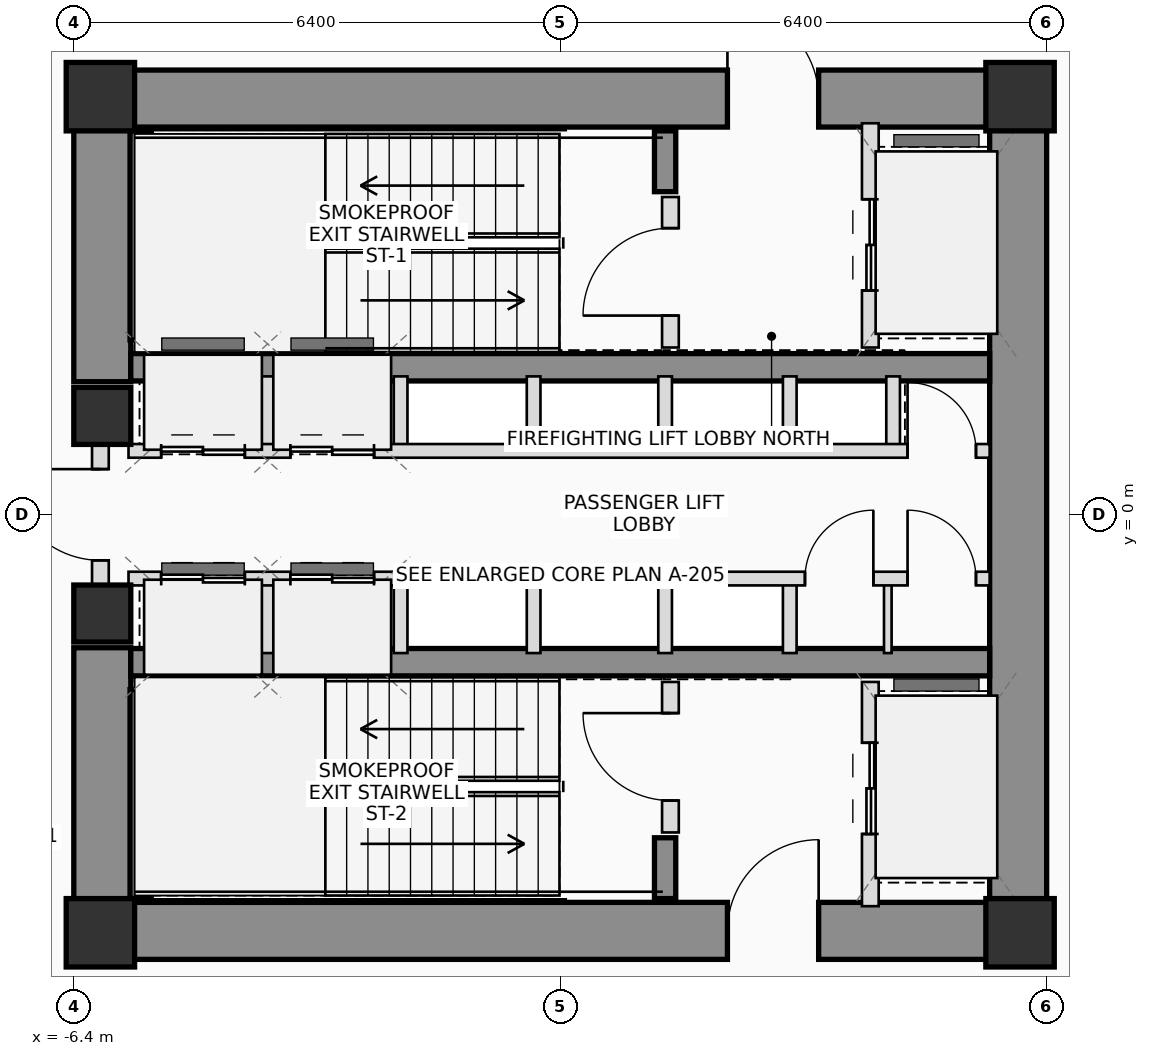
"""IFC4 building model, lengths in metres.
Left out: names, types, materials, properties, quantities, classifications, styles, units other than length and angle.
Written with IfcOpenShell. Run it as: python <this file> out.ifc"""

import sys

from ifc_helpers import new_model, si_unit, direction, frame, frame_2d, origin, origin_2d, place, context, subcontext, project, spatial, rectangle, extrude, source, transform, mapped, element, fill, save


model = new_model("IFC4")
c1 = context("Model", 3, precision=1e-05, world=origin(), true_north=direction((0.0, 1.0)))
c2 = subcontext(c1, "Body", "Model", "MODEL_VIEW")
j1 = project(units=[si_unit("LENGTHUNIT", "METRE"), si_unit("PLANEANGLEUNIT", "RADIAN")], contexts=[c1])
p1 = place(None, origin())
s1 = spatial("IfcSite", under=j1, at=p1, CompositionType="ELEMENT")
p2 = place(p1, origin())
s2 = spatial("IfcBuilding", under=s1, at=p2, CompositionType="ELEMENT")
p3 = place(p2, frame((0.0, 0.0, 42.3)))
s3 = spatial("IfcBuildingStorey", under=s2, at=p3, CompositionType="ELEMENT", Elevation=42.3)
m1 = source(origin(), c2, "Body", "SweptSolid", [
    extrude(rectangle(XDim=0.9, YDim=0.9, at=origin_2d()), origin(), (0.0, 0.0, 1.0), 3.7),
])
for number, where, z_axis, x_axis in (
    (1, (-6.05, -5.5, 0.0), (0.0, 0.0, 1.0), (1.0, 0.0, 0.0)),
    (2, (6.05, -5.5, 0.0), (0.0, 0.0, 1.0), (1.0, 0.0, 0.0)),
    (3, (6.05, 5.5, 0.0), (0.0, 0.0, 1.0), (1.0, 0.0, 0.0)),
    (4, (-6.05, 5.5, 0.0), (0.0, 0.0, 1.0), (1.0, 0.0, 0.0)),
):
    element("IfcColumn", number, at=place(p3, frame(where, z_axis=z_axis, x_axis=x_axis)), inside=s3, PredefinedType="COLUMN", context=c2, shape_type="MappedRepresentation", body=[
        mapped(m1, transform((0.0, 0.0, 0.0), scale=1.0)),
    ])
p4 = place(p3, frame((-6.4, 5.475, 0.0), z_axis=(0.0, 0.0, 1.0), x_axis=(1.0, 0.0, 0.0)))
e5 = element("IfcWall", 5, at=p4, inside=s3, PredefinedType="SHEAR", context=c2, shape_type="SweptSolid", body=[
    extrude(rectangle(XDim=12.8, YDim=0.75, at=frame_2d((6.4, 0.0))), origin(), (0.0, 0.0, 1.0), 3.7),
])
p5 = place(p4, frame((8.6, 0.0, 0.0)))
e6 = element("IfcOpeningElement", 6, at=p5, cuts=e5, PredefinedType="OPENING", context=c2, shape_type="SweptSolid", body=[
    extrude(rectangle(XDim=1.2, YDim=2.2, at=frame_2d((0.6, 1.1))), frame((0.0, 0.385, 0.0), z_axis=(0.0, -1.0, 0.0), x_axis=(1.0, 0.0, 0.0)), (0.0, 0.0, 1.0), 0.77),
])
p6 = place(p3, frame((-6.4, -5.475, 0.0), z_axis=(0.0, 0.0, 1.0), x_axis=(1.0, 0.0, 0.0)))
e7 = element("IfcWall", 7, at=p6, inside=s3, PredefinedType="SHEAR", context=c2, shape_type="SweptSolid", body=[
    extrude(rectangle(XDim=12.8, YDim=0.75, at=frame_2d((6.4, 0.0))), origin(), (0.0, 0.0, 1.0), 3.7),
])
p7 = place(p6, frame((8.6, 0.0, 0.0)))
e8 = element("IfcOpeningElement", 8, at=p7, cuts=e7, PredefinedType="OPENING", context=c2, shape_type="SweptSolid", body=[
    extrude(rectangle(XDim=1.2, YDim=2.2, at=frame_2d((0.6, 1.1))), frame((0.0, 0.385, 0.0), z_axis=(0.0, -1.0, 0.0), x_axis=(1.0, 0.0, 0.0)), (0.0, 0.0, 1.0), 0.77),
])
p8 = place(p3, frame((6.025, -5.1, 0.0), z_axis=(0.0, 0.0, 1.0), x_axis=(0.0, 1.0, 0.0)))
e9 = element("IfcWall", 9, at=p8, inside=s3, PredefinedType="SHEAR", context=c2, shape_type="SweptSolid", body=[
    extrude(rectangle(XDim=10.2, YDim=0.75, at=frame_2d((5.1, 0.0))), origin(), (0.0, 0.0, 1.0), 3.7),
])
for number, where, z_axis, x_axis in (
    (10, (-6.025, -5.1, 0.0), (0.0, 0.0, 1.0), (0.0, 1.0, 0.0)),
    (11, (-6.025, 1.75, 0.0), (0.0, 0.0, 1.0), (0.0, 1.0, 0.0)),
):
    element("IfcWall", number, at=place(p3, frame(where, z_axis=z_axis, x_axis=x_axis)), inside=s3, PredefinedType="SHEAR", context=c2, shape_type="SweptSolid", body=[
        extrude(rectangle(XDim=3.35, YDim=0.75, at=frame_2d((1.675, 0.0))), origin(), (0.0, 0.0, 1.0), 3.7),
    ])
for number, where, z_axis, x_axis in (
    (12, (-5.65, 1.94, 0.0), (0.0, 0.0, 1.0), (1.0, 0.0, 0.0)),
    (13, (-5.65, -1.94, 0.0), (0.0, 0.0, 1.0), (1.0, 0.0, 0.0)),
):
    element("IfcWall", number, at=place(p3, frame(where, z_axis=z_axis, x_axis=x_axis)), inside=s3, PredefinedType="SHEAR", context=c2, shape_type="SweptSolid", body=[
        extrude(rectangle(XDim=11.3, YDim=0.36, at=frame_2d((5.65, 0.0))), origin(), (0.0, 0.0, 1.0), 3.7),
    ])
p9 = place(p3, frame((-5.52, 2.3, 0.0), z_axis=(0.0, 0.0, 1.0), x_axis=(0.0, 1.0, 0.0)))
e14 = element("IfcWall", 14, at=p9, inside=s3, PredefinedType="SHEAR", context=c2, shape_type="SweptSolid", body=[
    extrude(rectangle(XDim=2.75, YDim=0.28, at=frame_2d((1.375, 0.0))), origin(), (0.0, 0.0, 1.0), 3.7),
])
p10 = place(p3, frame((1.38, 4.25, 0.0), z_axis=(0.0, 0.0, 1.0), x_axis=(0.0, 1.0, 0.0)))
e15 = element("IfcWall", 15, at=p10, inside=s3, PredefinedType="SHEAR", context=c2, shape_type="SweptSolid", body=[
    extrude(rectangle(XDim=0.8, YDim=0.28, at=frame_2d((0.4, 0.0))), origin(), (0.0, 0.0, 1.0), 3.7),
])
p11 = place(p3, frame((-5.52, -5.05, 0.0), z_axis=(0.0, 0.0, 1.0), x_axis=(0.0, 1.0, 0.0)))
e16 = element("IfcWall", 16, at=p11, inside=s3, PredefinedType="SHEAR", context=c2, shape_type="SweptSolid", body=[
    extrude(rectangle(XDim=2.75, YDim=0.28, at=frame_2d((1.375, 0.0))), origin(), (0.0, 0.0, 1.0), 3.7),
])
p12 = place(p3, frame((1.38, -5.05, 0.0), z_axis=(0.0, 0.0, 1.0), x_axis=(0.0, 1.0, 0.0)))
e17 = element("IfcWall", 17, at=p12, inside=s3, PredefinedType="SHEAR", context=c2, shape_type="SweptSolid", body=[
    extrude(rectangle(XDim=0.8, YDim=0.28, at=frame_2d((0.4, 0.0))), origin(), (0.0, 0.0, 1.0), 3.7),
])
m2 = source(origin(), c2, "Body", "SweptSolid", [
    extrude(rectangle(XDim=0.75, YDim=0.75, at=origin_2d()), origin(), (0.0, 0.0, 1.0), 3.7),
])
for number, where, z_axis, x_axis in (
    (18, (-6.025, -1.3, 0.0), (0.0, 0.0, 1.0), (1.0, 0.0, 0.0)),
    (19, (-6.025, 1.3, 0.0), (0.0, 0.0, 1.0), (1.0, 0.0, 0.0)),
):
    element("IfcColumn", number, at=place(p3, frame(where, z_axis=z_axis, x_axis=x_axis)), inside=s3, PredefinedType="COLUMN", context=c2, shape_type="MappedRepresentation", body=[
        mapped(m2, transform((0.0, 0.0, 0.0), scale=1.0)),
    ])
p13 = place(p3, frame((-6.05, -0.95, 0.0), z_axis=(0.0, 0.0, 1.0), x_axis=(0.0, 1.0, 0.0)))
e20 = element("IfcWall", 20, at=p13, inside=s3, PredefinedType="PLUMBINGWALL", context=c2, shape_type="SweptSolid", body=[
    extrude(rectangle(XDim=1.9, YDim=0.22, at=frame_2d((0.95, 0.0))), origin(), (0.0, 0.0, 1.0), 2.475),
])
p14 = place(p13, frame((0.35, 0.0, 0.0)))
e21 = element("IfcOpeningElement", 21, at=p14, cuts=e20, PredefinedType="OPENING", context=c2, shape_type="SweptSolid", body=[
    extrude(rectangle(XDim=1.2, YDim=2.2, at=frame_2d((0.6, 1.1))), frame((0.0, 0.12, 0.0), z_axis=(0.0, -1.0, 0.0), x_axis=(1.0, 0.0, 0.0)), (0.0, 0.0, 1.0), 0.24),
])
p15 = place(p3, frame((1.45, 2.2, 0.0), z_axis=(0.0, 0.0, 1.0), x_axis=(0.0, 1.0, 0.0)))
e22 = element("IfcWall", 22, at=p15, inside=s3, PredefinedType="PLUMBINGWALL", context=c2, shape_type="SweptSolid", body=[
    extrude(rectangle(XDim=1.98, YDim=0.22, at=frame_2d((0.99, 0.0))), origin(), (0.0, 0.0, 1.0), 3.495),
])
p16 = place(p15, frame((0.42, 0.0, 0.0)))
e23 = element("IfcOpeningElement", 23, at=p16, cuts=e22, PredefinedType="OPENING", context=c2, shape_type="SweptSolid", body=[
    extrude(rectangle(XDim=1.15, YDim=2.15, at=frame_2d((0.575, 1.075))), frame((0.0, 0.12, 0.0), z_axis=(0.0, -1.0, 0.0), x_axis=(1.0, 0.0, 0.0)), (0.0, 0.0, 1.0), 0.24),
])
p17 = place(p3, frame((4.08, 2.2, 0.0), z_axis=(0.0, 0.0, 1.0), x_axis=(0.0, 1.0, 0.0)))
e24 = element("IfcWall", 24, at=p17, inside=s3, PredefinedType="PLUMBINGWALL", context=c2, shape_type="SweptSolid", body=[
    extrude(rectangle(XDim=2.95, YDim=0.22, at=frame_2d((1.475, 0.0))), origin(), (0.0, 0.0, 1.0), 3.495),
])
p18 = place(p17, frame((0.75, 0.0, 0.0)))
e25 = element("IfcOpeningElement", 25, at=p18, cuts=e24, PredefinedType="OPENING", context=c2, shape_type="SweptSolid", body=[
    extrude(rectangle(XDim=1.2, YDim=2.25, at=frame_2d((0.6, 1.125))), frame((0.0, 0.12, 0.0), z_axis=(0.0, -1.0, 0.0), x_axis=(1.0, 0.0, 0.0)), (0.0, 0.0, 1.0), 0.24),
])
p19 = place(p3, frame((1.45, -4.18, 0.0), z_axis=(0.0, 0.0, 1.0), x_axis=(0.0, 1.0, 0.0)))
e26 = element("IfcWall", 26, at=p19, inside=s3, PredefinedType="PLUMBINGWALL", context=c2, shape_type="SweptSolid", body=[
    extrude(rectangle(XDim=1.98, YDim=0.22, at=frame_2d((0.99, 0.0))), origin(), (0.0, 0.0, 1.0), 3.495),
])
p20 = place(p19, frame((0.42, 0.0, 0.0)))
e27 = element("IfcOpeningElement", 27, at=p20, cuts=e26, PredefinedType="OPENING", context=c2, shape_type="SweptSolid", body=[
    extrude(rectangle(XDim=1.15, YDim=2.15, at=frame_2d((0.575, 1.075))), frame((0.0, 0.12, 0.0), z_axis=(0.0, -1.0, 0.0), x_axis=(1.0, 0.0, 0.0)), (0.0, 0.0, 1.0), 0.24),
])
p21 = place(p3, frame((4.08, -5.15, 0.0), z_axis=(0.0, 0.0, 1.0), x_axis=(0.0, 1.0, 0.0)))
e28 = element("IfcWall", 28, at=p21, inside=s3, PredefinedType="PLUMBINGWALL", context=c2, shape_type="SweptSolid", body=[
    extrude(rectangle(XDim=2.95, YDim=0.22, at=frame_2d((1.475, 0.0))), origin(), (0.0, 0.0, 1.0), 3.495),
])
p22 = place(p21, frame((0.95, 0.0, 0.0)))
e29 = element("IfcOpeningElement", 29, at=p22, cuts=e28, PredefinedType="OPENING", context=c2, shape_type="SweptSolid", body=[
    extrude(rectangle(XDim=1.2, YDim=2.25, at=frame_2d((0.6, 1.125))), frame((0.0, 0.12, 0.0), z_axis=(0.0, -1.0, 0.0), x_axis=(1.0, 0.0, 0.0)), (0.0, 0.0, 1.0), 0.24),
])
for number, where, z_axis, x_axis in (
    (30, (-3.85, 0.84, 0.0), (0.0, 0.0, 1.0), (0.0, 1.0, 0.0)),
    (31, (-3.85, -1.82, 0.0), (0.0, 0.0, 1.0), (0.0, 1.0, 0.0)),
    (32, (-2.1, 0.84, 0.0), (0.0, 0.0, 1.0), (0.0, 1.0, 0.0)),
    (33, (-2.1, -1.82, 0.0), (0.0, 0.0, 1.0), (0.0, 1.0, 0.0)),
    (34, (-0.35, 0.84, 0.0), (0.0, 0.0, 1.0), (0.0, 1.0, 0.0)),
    (35, (-0.35, -1.82, 0.0), (0.0, 0.0, 1.0), (0.0, 1.0, 0.0)),
    (36, (1.38, 0.84, 0.0), (0.0, 0.0, 1.0), (0.0, 1.0, 0.0)),
    (37, (1.38, -1.82, 0.0), (0.0, 0.0, 1.0), (0.0, 1.0, 0.0)),
    (38, (3.02, 0.84, 0.0), (0.0, 0.0, 1.0), (0.0, 1.0, 0.0)),
    (39, (4.38, 0.84, 0.0), (0.0, 0.0, 1.0), (0.0, 1.0, 0.0)),
    (40, (3.02, -1.82, 0.0), (0.0, 0.0, 1.0), (0.0, 1.0, 0.0)),
):
    element("IfcWall", number, at=place(p3, frame(where, z_axis=z_axis, x_axis=x_axis)), inside=s3, PredefinedType="PLUMBINGWALL", context=c2, shape_type="SweptSolid", body=[
        extrude(rectangle(XDim=0.98, YDim=0.18, at=frame_2d((0.49, 0.0))), origin(), (0.0, 0.0, 1.0), 3.495),
    ])
p23 = place(p3, frame((4.31, -1.82, 0.0), z_axis=(0.0, 0.0, 1.0), x_axis=(0.0, 1.0, 0.0)))
e41 = element("IfcWall", 41, at=p23, inside=s3, PredefinedType="PARTITIONING", context=c2, shape_type="SweptSolid", body=[
    extrude(rectangle(XDim=0.98, YDim=0.1, at=frame_2d((0.49, 0.0))), origin(), (0.0, 0.0, 1.0), 3.495),
])
p24 = place(p3, frame((-5.68, 0.84, 0.0), z_axis=(0.0, 0.0, 1.0), x_axis=(1.0, 0.0, 0.0)))
e42 = element("IfcWall", 42, at=p24, inside=s3, PredefinedType="PLUMBINGWALL", context=c2, shape_type="SweptSolid", body=[
    extrude(rectangle(XDim=11.33, YDim=0.18, at=frame_2d((5.665, 0.0))), origin(), (0.0, 0.0, 1.0), 3.495),
])
p25 = place(p24, frame((0.43, 0.0, 0.0)))
e43 = element("IfcOpeningElement", 43, at=p25, cuts=e42, PredefinedType="OPENING", context=c2, shape_type="SweptSolid", body=[
    extrude(rectangle(XDim=1.1, YDim=2.2, at=frame_2d((0.55, 1.1))), frame((0.0, 0.1, 0.0), z_axis=(0.0, -1.0, 0.0), x_axis=(1.0, 0.0, 0.0)), (0.0, 0.0, 1.0), 0.2),
])
p26 = place(p24, frame((2.13, 0.0, 0.0)))
e44 = element("IfcOpeningElement", 44, at=p26, cuts=e42, PredefinedType="OPENING", context=c2, shape_type="SweptSolid", body=[
    extrude(rectangle(XDim=1.1, YDim=2.2, at=frame_2d((0.55, 1.1))), frame((0.0, 0.1, 0.0), z_axis=(0.0, -1.0, 0.0), x_axis=(1.0, 0.0, 0.0)), (0.0, 0.0, 1.0), 0.2),
])
p27 = place(p24, frame((10.25, 0.0, 0.0)))
e45 = element("IfcOpeningElement", 45, at=p27, cuts=e42, PredefinedType="OPENING", context=c2, shape_type="SweptSolid", body=[
    extrude(rectangle(XDim=0.9, YDim=2.05, at=frame_2d((0.45, 1.025))), frame((0.0, 0.1, 0.0), z_axis=(0.0, -1.0, 0.0), x_axis=(1.0, 0.0, 0.0)), (0.0, 0.0, 1.0), 0.2),
])
p28 = place(p3, frame((-5.68, -0.84, 0.0), z_axis=(0.0, 0.0, 1.0), x_axis=(1.0, 0.0, 0.0)))
e46 = element("IfcWall", 46, at=p28, inside=s3, PredefinedType="PLUMBINGWALL", context=c2, shape_type="SweptSolid", body=[
    extrude(rectangle(XDim=11.33, YDim=0.18, at=frame_2d((5.665, 0.0))), origin(), (0.0, 0.0, 1.0), 3.495),
])
p29 = place(p28, frame((0.43, 0.0, 0.0)))
e47 = element("IfcOpeningElement", 47, at=p29, cuts=e46, PredefinedType="OPENING", context=c2, shape_type="SweptSolid", body=[
    extrude(rectangle(XDim=1.1, YDim=2.2, at=frame_2d((0.55, 1.1))), frame((0.0, 0.1, 0.0), z_axis=(0.0, -1.0, 0.0), x_axis=(1.0, 0.0, 0.0)), (0.0, 0.0, 1.0), 0.2),
])
p30 = place(p28, frame((2.13, 0.0, 0.0)))
e48 = element("IfcOpeningElement", 48, at=p30, cuts=e46, PredefinedType="OPENING", context=c2, shape_type="SweptSolid", body=[
    extrude(rectangle(XDim=1.1, YDim=2.2, at=frame_2d((0.55, 1.1))), frame((0.0, 0.1, 0.0), z_axis=(0.0, -1.0, 0.0), x_axis=(1.0, 0.0, 0.0)), (0.0, 0.0, 1.0), 0.2),
])
p31 = place(p28, frame((8.9, 0.0, 0.0)))
e49 = element("IfcOpeningElement", 49, at=p31, cuts=e46, PredefinedType="OPENING", context=c2, shape_type="SweptSolid", body=[
    extrude(rectangle(XDim=0.9, YDim=2.05, at=frame_2d((0.45, 1.025))), frame((0.0, 0.1, 0.0), z_axis=(0.0, -1.0, 0.0), x_axis=(1.0, 0.0, 0.0)), (0.0, 0.0, 1.0), 0.2),
])
p32 = place(p28, frame((10.25, 0.0, 0.0)))
e50 = element("IfcOpeningElement", 50, at=p32, cuts=e46, PredefinedType="OPENING", context=c2, shape_type="SweptSolid", body=[
    extrude(rectangle(XDim=0.9, YDim=2.05, at=frame_2d((0.45, 1.025))), frame((0.0, 0.1, 0.0), z_axis=(0.0, -1.0, 0.0), x_axis=(1.0, 0.0, 0.0)), (0.0, 0.0, 1.0), 0.2),
])
p33 = place(p5, origin())
e51 = element("IfcDoor", 51, at=p33, inside=s3, OperationType="SINGLE_SWING_LEFT", PredefinedType="DOOR", context=c2, shape_type="SweptSolid", body=[
    extrude(rectangle(XDim=1.2, YDim=2.2, at=frame_2d((0.6, 1.1))), frame((0.0, 0.025, 0.0), z_axis=(0.0, -1.0, 0.0), x_axis=(1.0, 0.0, 0.0)), (0.0, 0.0, 1.0), 0.05),
])
fill(e6, e51)
p34 = place(p7, origin())
e52 = element("IfcDoor", 52, at=p34, inside=s3, OperationType="SINGLE_SWING_RIGHT", PredefinedType="DOOR", context=c2, shape_type="SweptSolid", body=[
    extrude(rectangle(XDim=1.2, YDim=2.2, at=frame_2d((0.6, 1.1))), frame((0.0, 0.025, 0.0), z_axis=(0.0, -1.0, 0.0), x_axis=(1.0, 0.0, 0.0)), (0.0, 0.0, 1.0), 0.05),
])
fill(e8, e52)
p35 = place(p14, origin())
e53 = element("IfcDoor", 53, at=p35, inside=s3, OperationType="SINGLE_SWING_RIGHT", PredefinedType="DOOR", context=c2, shape_type="SweptSolid", body=[
    extrude(rectangle(XDim=1.2, YDim=2.2, at=frame_2d((0.6, 1.1))), frame((0.0, 0.025, 0.0), z_axis=(0.0, -1.0, 0.0), x_axis=(1.0, 0.0, 0.0)), (0.0, 0.0, 1.0), 0.05),
])
fill(e21, e53)
p36 = place(p16, origin())
e54 = element("IfcDoor", 54, at=p36, inside=s3, OperationType="SINGLE_SWING_LEFT", PredefinedType="DOOR", context=c2, shape_type="SweptSolid", body=[
    extrude(rectangle(XDim=1.15, YDim=2.15, at=frame_2d((0.575, 1.075))), frame((0.0, 0.025, 0.0), z_axis=(0.0, -1.0, 0.0), x_axis=(1.0, 0.0, 0.0)), (0.0, 0.0, 1.0), 0.05),
])
fill(e23, e54)
p37 = place(p18, origin())
e55 = element("IfcDoor", 55, at=p37, inside=s3, OperationType="DOUBLE_DOOR_SLIDING", PredefinedType="DOOR", context=c2, shape_type="SweptSolid", body=[
    extrude(rectangle(XDim=1.2, YDim=2.25, at=frame_2d((0.6, 1.125))), frame((0.0, 0.025, 0.0), z_axis=(0.0, -1.0, 0.0), x_axis=(1.0, 0.0, 0.0)), (0.0, 0.0, 1.0), 0.05),
])
fill(e25, e55)
p38 = place(p20, origin())
e56 = element("IfcDoor", 56, at=p38, inside=s3, OperationType="SINGLE_SWING_RIGHT", PredefinedType="DOOR", context=c2, shape_type="SweptSolid", body=[
    extrude(rectangle(XDim=1.15, YDim=2.15, at=frame_2d((0.575, 1.075))), frame((0.0, 0.025, 0.0), z_axis=(0.0, -1.0, 0.0), x_axis=(1.0, 0.0, 0.0)), (0.0, 0.0, 1.0), 0.05),
])
fill(e27, e56)
p39 = place(p22, origin())
e57 = element("IfcDoor", 57, at=p39, inside=s3, OperationType="DOUBLE_DOOR_SLIDING", PredefinedType="DOOR", context=c2, shape_type="SweptSolid", body=[
    extrude(rectangle(XDim=1.2, YDim=2.25, at=frame_2d((0.6, 1.125))), frame((0.0, 0.025, 0.0), z_axis=(0.0, -1.0, 0.0), x_axis=(1.0, 0.0, 0.0)), (0.0, 0.0, 1.0), 0.05),
])
fill(e29, e57)
p40 = place(p25, origin())
e58 = element("IfcDoor", 58, at=p40, inside=s3, OperationType="DOUBLE_DOOR_SLIDING", PredefinedType="DOOR", context=c2, shape_type="SweptSolid", body=[
    extrude(rectangle(XDim=1.1, YDim=2.2, at=frame_2d((0.55, 1.1))), frame((0.0, 0.025, 0.0), z_axis=(0.0, -1.0, 0.0), x_axis=(1.0, 0.0, 0.0)), (0.0, 0.0, 1.0), 0.05),
])
fill(e43, e58)
p41 = place(p26, origin())
e59 = element("IfcDoor", 59, at=p41, inside=s3, OperationType="DOUBLE_DOOR_SLIDING", PredefinedType="DOOR", context=c2, shape_type="SweptSolid", body=[
    extrude(rectangle(XDim=1.1, YDim=2.2, at=frame_2d((0.55, 1.1))), frame((0.0, 0.025, 0.0), z_axis=(0.0, -1.0, 0.0), x_axis=(1.0, 0.0, 0.0)), (0.0, 0.0, 1.0), 0.05),
])
fill(e44, e59)
p42 = place(p27, origin())
e60 = element("IfcDoor", 60, at=p42, inside=s3, OperationType="SINGLE_SWING_LEFT", PredefinedType="DOOR", context=c2, shape_type="SweptSolid", body=[
    extrude(rectangle(XDim=0.9, YDim=2.05, at=frame_2d((0.45, 1.025))), frame((0.0, 0.025, 0.0), z_axis=(0.0, -1.0, 0.0), x_axis=(1.0, 0.0, 0.0)), (0.0, 0.0, 1.0), 0.05),
])
fill(e45, e60)
p43 = place(p29, origin())
e61 = element("IfcDoor", 61, at=p43, inside=s3, OperationType="DOUBLE_DOOR_SLIDING", PredefinedType="DOOR", context=c2, shape_type="SweptSolid", body=[
    extrude(rectangle(XDim=1.1, YDim=2.2, at=frame_2d((0.55, 1.1))), frame((0.0, 0.025, 0.0), z_axis=(0.0, -1.0, 0.0), x_axis=(1.0, 0.0, 0.0)), (0.0, 0.0, 1.0), 0.05),
])
fill(e47, e61)
p44 = place(p30, origin())
e62 = element("IfcDoor", 62, at=p44, inside=s3, OperationType="DOUBLE_DOOR_SLIDING", PredefinedType="DOOR", context=c2, shape_type="SweptSolid", body=[
    extrude(rectangle(XDim=1.1, YDim=2.2, at=frame_2d((0.55, 1.1))), frame((0.0, 0.025, 0.0), z_axis=(0.0, -1.0, 0.0), x_axis=(1.0, 0.0, 0.0)), (0.0, 0.0, 1.0), 0.05),
])
fill(e48, e62)
p45 = place(p31, origin())
e63 = element("IfcDoor", 63, at=p45, inside=s3, OperationType="SINGLE_SWING_RIGHT", PredefinedType="DOOR", context=c2, shape_type="SweptSolid", body=[
    extrude(rectangle(XDim=0.9, YDim=2.05, at=frame_2d((0.45, 1.025))), frame((0.0, 0.025, 0.0), z_axis=(0.0, -1.0, 0.0), x_axis=(1.0, 0.0, 0.0)), (0.0, 0.0, 1.0), 0.05),
])
fill(e49, e63)
p46 = place(p32, origin())
e64 = element("IfcDoor", 64, at=p46, inside=s3, OperationType="SINGLE_SWING_LEFT", PredefinedType="DOOR", context=c2, shape_type="SweptSolid", body=[
    extrude(rectangle(XDim=0.9, YDim=2.05, at=frame_2d((0.45, 1.025))), frame((0.0, 0.025, 0.0), z_axis=(0.0, -1.0, 0.0), x_axis=(1.0, 0.0, 0.0)), (0.0, 0.0, 1.0), 0.05),
])
fill(e50, e64)
save(model, sys.argv[1])
